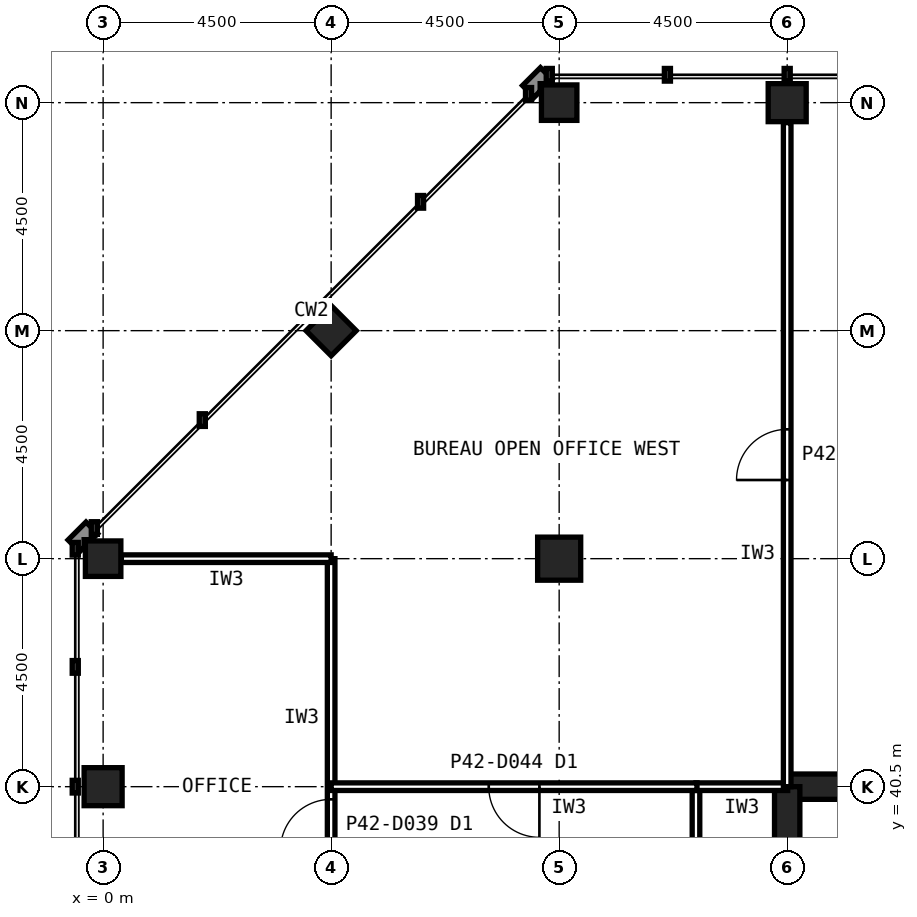
"""IFC4 building model, lengths in metres.
Left out: names, types, materials, properties, quantities, classifications, styles, units other than length and angle.
Written with IfcOpenShell. Run it as: python <this file> out.ifc"""

import sys

from ifc_helpers import new_model, si_unit, direction, frame, frame_2d, origin, origin_2d, place, context, subcontext, project, spatial, rectangle, hollow_rectangle, extrude, element, fill, save


model = new_model("IFC4")
c1 = context("Model", 3, precision=1e-05, world=origin(), true_north=direction((0.0, 1.0)))
c2 = subcontext(c1, "Body", "Model", "MODEL_VIEW")
j1 = project(units=[si_unit("LENGTHUNIT", "METRE"), si_unit("PLANEANGLEUNIT", "RADIAN")], contexts=[c1])
p1 = place(None, origin())
s1 = spatial("IfcSite", under=j1, at=p1, CompositionType="ELEMENT")
p2 = place(p1, origin())
s2 = spatial("IfcBuilding", under=s1, at=p2, CompositionType="ELEMENT")
p3 = place(p2, frame((0.0, 0.0, 175.6)))
s3 = spatial("IfcBuildingStorey", under=s2, at=p3, CompositionType="ELEMENT", Elevation=175.6)
p4 = place(p3, frame((13.5, 54.0, 0.0), z_axis=(0.0, 0.0, 1.0), x_axis=(1.0, 0.0, 0.0)))
e1 = element("IfcColumn", 1, at=p4, inside=s3, PredefinedType="COLUMN", context=c2, shape_type="SweptSolid", body=[
    extrude(hollow_rectangle(XDim=0.75, YDim=0.75, WallThickness=0.04, at=origin_2d()), origin(), (0.0, 0.0, 1.0), 4.0),
])
for number, where, z_axis, x_axis in (
    (2, (9.0, 54.0, 0.0), (0.0, 0.0, 1.0), (1.0, 0.0, 0.0)),
    (3, (0.0, 45.0, 0.0), (0.0, 0.0, 1.0), (1.0, 0.0, 0.0)),
):
    element("IfcColumn", number, at=place(p3, frame(where, z_axis=z_axis, x_axis=x_axis)), inside=s3, PredefinedType="COLUMN", context=c2, shape_type="SweptSolid", body=[
        extrude(hollow_rectangle(XDim=0.7, YDim=0.7, WallThickness=0.036, at=origin_2d()), origin(), (0.0, 0.0, 1.0), 4.0),
    ])
p5 = place(p3, frame((0.0, 40.5, 0.0), z_axis=(0.0, 0.0, 1.0), x_axis=(1.0, 0.0, 0.0)))
e4 = element("IfcColumn", 4, at=p5, inside=s3, PredefinedType="COLUMN", context=c2, shape_type="SweptSolid", body=[
    extrude(hollow_rectangle(XDim=0.75, YDim=0.75, WallThickness=0.04, at=origin_2d()), origin(), (0.0, 0.0, 1.0), 4.0),
])
p6 = place(p3, frame((4.5, 49.5, 0.0), z_axis=(0.0, 0.0, 1.0), x_axis=(0.707106781187, 0.707106781187, 0.0)))
e5 = element("IfcColumn", 5, at=p6, inside=s3, PredefinedType="COLUMN", context=c2, shape_type="SweptSolid", body=[
    extrude(hollow_rectangle(XDim=0.7, YDim=0.7, WallThickness=0.036, at=origin_2d()), origin(), (0.0, 0.0, 1.0), 4.0),
])
p7 = place(p3, frame((9.0, 45.0, 0.0), z_axis=(0.0, 0.0, 1.0), x_axis=(1.0, 0.0, 0.0)))
e6 = element("IfcColumn", 6, at=p7, inside=s3, PredefinedType="COLUMN", context=c2, shape_type="SweptSolid", body=[
    extrude(hollow_rectangle(XDim=0.85, YDim=0.85, WallThickness=0.05, at=origin_2d()), origin(), (0.0, 0.0, 1.0), 4.0),
])
p8 = place(p3, frame((40.5, 40.5, 0.0), z_axis=(0.0, 0.0, 1.0), x_axis=(-1.0, 0.0, 0.0)))
e7 = element("IfcWall", 7, at=p8, inside=s3, PredefinedType="SHEAR", context=c2, shape_type="SweptSolid", body=[
    extrude(rectangle(XDim=27.0, YDim=0.5, at=frame_2d((13.5, 0.0))), origin(), (0.0, 0.0, 1.0), 4.0),
])
p9 = place(p3, frame((13.5, 40.5, 0.0), z_axis=(0.0, 0.0, 1.0), x_axis=(0.0, -1.0, 0.0)))
e8 = element("IfcWall", 8, at=p9, inside=s3, PredefinedType="SHEAR", context=c2, shape_type="SweptSolid", body=[
    extrude(rectangle(XDim=27.0, YDim=0.5, at=frame_2d((13.5, 0.0))), origin(), (0.0, 0.0, 1.0), 4.0),
])
p10 = place(p9, frame((19.65, 0.0, 0.0)))
e9 = element("IfcOpeningElement", 9, at=p10, cuts=e8, PredefinedType="OPENING", context=c2, shape_type="SweptSolid", body=[
    extrude(rectangle(XDim=1.2, YDim=2.1, at=frame_2d((0.6, 1.05))), frame((0.0, 0.26, 0.0), z_axis=(0.0, -1.0, 0.0), x_axis=(1.0, 0.0, 0.0)), (0.0, 0.0, 1.0), 0.52),
])
p11 = place(p9, frame((5.85, 0.0, 0.0)))
e10 = element("IfcOpeningElement", 10, at=p11, cuts=e8, PredefinedType="OPENING", context=c2, shape_type="SweptSolid", body=[
    extrude(rectangle(XDim=1.8, YDim=2.1, at=frame_2d((0.9, 1.05))), frame((0.0, 0.26, 0.0), z_axis=(0.0, -1.0, 0.0), x_axis=(1.0, 0.0, 0.0)), (0.0, 0.0, 1.0), 0.52),
])
p12 = place(p3, frame((11.7, 40.5, 0.0), z_axis=(0.0, 0.0, 1.0), x_axis=(0.0, -1.0, 0.0)))
e11 = element("IfcWall", 11, at=p12, inside=s3, PredefinedType="PARTITIONING", context=c2, shape_type="SweptSolid", body=[
    extrude(rectangle(XDim=7.2, YDim=0.15, at=frame_2d((3.6, 0.0))), origin(), (0.0, 0.0, 1.0), 3.84),
])
p13 = place(p3, frame((13.51, 40.5, 0.0), z_axis=(0.0, 0.0, 1.0), x_axis=(-1.0, 0.0, 0.0)))
e12 = element("IfcWall", 12, at=p13, inside=s3, PredefinedType="PARTITIONING", context=c2, shape_type="SweptSolid", body=[
    extrude(rectangle(XDim=1.81, YDim=0.15, at=frame_2d((0.905, 0.0))), origin(), (0.0, 0.0, 1.0), 2.989),
])
p14 = place(p3, frame((4.5, 36.0, 0.0), z_axis=(0.0, 0.0, 1.0), x_axis=(0.0, 1.0, 0.0)))
e13 = element("IfcWall", 13, at=p14, inside=s3, PredefinedType="PARTITIONING", context=c2, shape_type="SweptSolid", body=[
    extrude(rectangle(XDim=9.0, YDim=0.15, at=frame_2d((4.5, 0.0))), origin(), (0.0, 0.0, 1.0), 3.84),
])
p15 = place(p14, frame((3.25, 0.0, 0.0)))
e14 = element("IfcOpeningElement", 14, at=p15, cuts=e13, PredefinedType="OPENING", context=c2, shape_type="SweptSolid", body=[
    extrude(rectangle(XDim=1.0, YDim=2.1, at=frame_2d((0.5, 1.05))), frame((0.0, 0.085, 0.0), z_axis=(0.0, -1.0, 0.0), x_axis=(1.0, 0.0, 0.0)), (0.0, 0.0, 1.0), 0.17),
])
p16 = place(p3, frame((4.5, 45.0, 0.0), z_axis=(0.0, 0.0, 1.0), x_axis=(-1.0, 0.0, 0.0)))
e15 = element("IfcWall", 15, at=p16, inside=s3, PredefinedType="PARTITIONING", context=c2, shape_type="SweptSolid", body=[
    extrude(rectangle(XDim=4.14, YDim=0.15, at=frame_2d((2.07, 0.0))), origin(), (0.0, 0.0, 1.0), 3.229),
])
p17 = place(p3, frame((13.5, 40.5, 0.0), z_axis=(0.0, 0.0, 1.0), x_axis=(0.0, 1.0, 0.0)))
e16 = element("IfcWall", 16, at=p17, inside=s3, PredefinedType="PARTITIONING", context=c2, shape_type="SweptSolid", body=[
    extrude(rectangle(XDim=13.105, YDim=0.15, at=frame_2d((6.552, 0.0))), origin(), (0.0, 0.0, 1.0), 2.989),
])
p18 = place(p17, frame((6.052, 0.0, 0.0)))
e17 = element("IfcOpeningElement", 17, at=p18, cuts=e16, PredefinedType="OPENING", context=c2, shape_type="SweptSolid", body=[
    extrude(rectangle(XDim=1.0, YDim=2.1, at=frame_2d((0.5, 1.05))), frame((0.0, 0.085, 0.0), z_axis=(0.0, -1.0, 0.0), x_axis=(1.0, 0.0, 0.0)), (0.0, 0.0, 1.0), 0.17),
])
p19 = place(p3, frame((11.72, 40.5, 0.0), z_axis=(0.0, 0.0, 1.0), x_axis=(-1.0, 0.0, 0.0)))
e18 = element("IfcWall", 18, at=p19, inside=s3, PredefinedType="PARTITIONING", context=c2, shape_type="SweptSolid", body=[
    extrude(rectangle(XDim=7.22, YDim=0.15, at=frame_2d((3.61, 0.0))), origin(), (0.0, 0.0, 1.0), 2.989),
])
p20 = place(p19, frame((3.11, 0.0, 0.0)))
e19 = element("IfcOpeningElement", 19, at=p20, cuts=e18, PredefinedType="OPENING", context=c2, shape_type="SweptSolid", body=[
    extrude(rectangle(XDim=1.0, YDim=2.1, at=frame_2d((0.5, 1.05))), frame((0.0, 0.085, 0.0), z_axis=(0.0, -1.0, 0.0), x_axis=(1.0, 0.0, 0.0)), (0.0, 0.0, 1.0), 0.17),
])
p21 = place(p15, origin())
e20 = element("IfcDoor", 20, at=p21, inside=s3, OperationType="SINGLE_SWING_LEFT", PredefinedType="DOOR", context=c2, shape_type="SweptSolid", body=[
    extrude(rectangle(XDim=1.0, YDim=2.1, at=frame_2d((0.5, 1.05))), frame((0.0, 0.025, 0.0), z_axis=(0.0, -1.0, 0.0), x_axis=(1.0, 0.0, 0.0)), (0.0, 0.0, 1.0), 0.05),
])
fill(e14, e20)
p22 = place(p18, origin())
e21 = element("IfcDoor", 21, at=p22, inside=s3, OperationType="SINGLE_SWING_LEFT", PredefinedType="DOOR", context=c2, shape_type="SweptSolid", body=[
    extrude(rectangle(XDim=1.0, YDim=2.1, at=frame_2d((0.5, 1.05))), frame((0.0, 0.025, 0.0), z_axis=(0.0, -1.0, 0.0), x_axis=(1.0, 0.0, 0.0)), (0.0, 0.0, 1.0), 0.05),
])
fill(e17, e21)
p23 = place(p20, origin())
e22 = element("IfcDoor", 22, at=p23, inside=s3, OperationType="SINGLE_SWING_LEFT", PredefinedType="DOOR", context=c2, shape_type="SweptSolid", body=[
    extrude(rectangle(XDim=1.0, YDim=2.1, at=frame_2d((0.5, 1.05))), frame((0.0, 0.025, 0.0), z_axis=(0.0, -1.0, 0.0), x_axis=(1.0, 0.0, 0.0)), (0.0, 0.0, 1.0), 0.05),
])
fill(e19, e22)
save(model, sys.argv[1])
